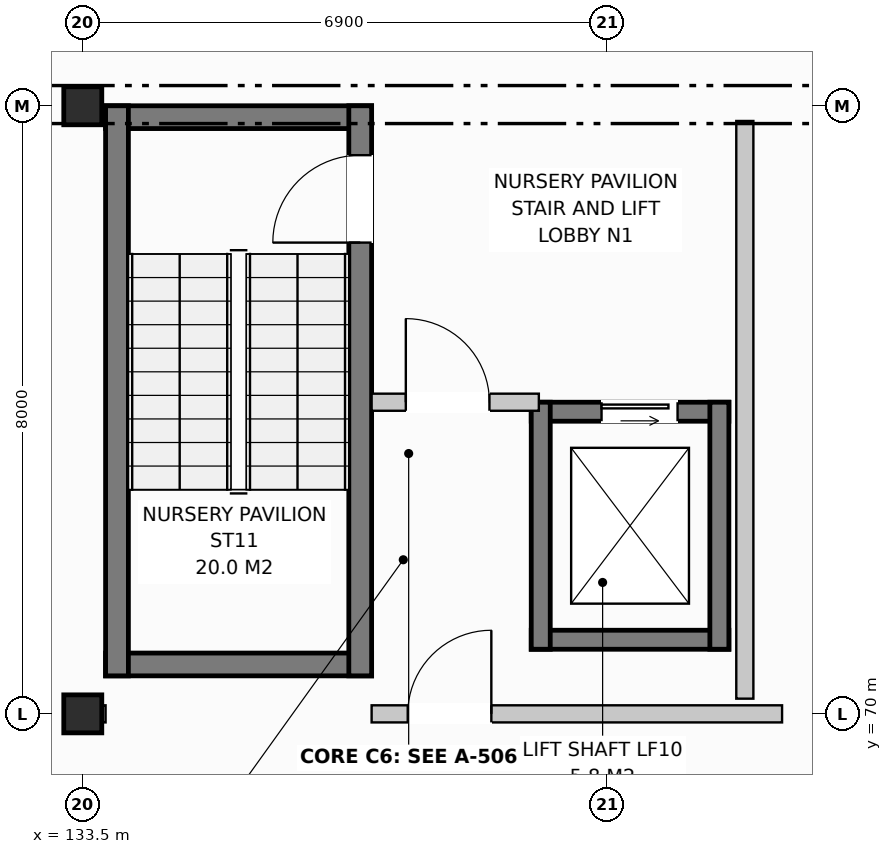
"""IFC4 building model, lengths in metres.
Left out: names, types, materials, properties, quantities, classifications, styles, units other than length and angle.
Written with IfcOpenShell. Run it as: python <this file> out.ifc"""

import sys

from ifc_helpers import new_model, si_unit, direction, frame, frame_2d, origin, origin_with_axes, origin_2d, place, context, subcontext, project, spatial, rectangle, extrude, element, fill, save


model = new_model("IFC4")
c1 = context("Model", 3, precision=1e-05, world=origin(), true_north=direction((0.0, 1.0)))
c2 = subcontext(c1, "Body", "Model", "MODEL_VIEW")
j1 = project(units=[si_unit("LENGTHUNIT", "METRE"), si_unit("PLANEANGLEUNIT", "RADIAN")], contexts=[c1])
p1 = place(None, origin())
s1 = spatial("IfcSite", under=j1, at=p1, CompositionType="ELEMENT")
p2 = place(p1, origin())
s2 = spatial("IfcBuilding", under=s1, at=p2, CompositionType="ELEMENT")
p3 = place(p2, frame((0.0, 0.0, -3.8)))
s3 = spatial("IfcBuildingStorey", under=s2, at=p3, CompositionType="ELEMENT", Elevation=-3.8)
for number, where, z_axis, x_axis in (
    (1, (133.5, 70.0, 0.0), (0.0, 0.0, 1.0), (1.0, 0.0, 0.0)),
    (2, (133.5, 78.0, 0.0), (0.0, 0.0, 1.0), (1.0, 0.0, 0.0)),
):
    element("IfcColumn", number, at=place(p3, frame(where, z_axis=z_axis, x_axis=x_axis)), inside=s3, PredefinedType="COLUMN", context=c2, shape_type="SweptSolid", body=[
        extrude(rectangle(XDim=0.5, YDim=0.5, at=origin_2d()), origin(), (0.0, 0.0, 1.0), 3.8),
    ])
for number, where, z_axis, x_axis in (
    (3, (133.8, 77.85, 0.0), (0.0, 0.0, 1.0), (1.0, 0.0, 0.0)),
    (4, (133.8, 70.65, 0.0), (0.0, 0.0, 1.0), (1.0, 0.0, 0.0)),
):
    element("IfcWall", number, at=place(p3, frame(where, z_axis=z_axis, x_axis=x_axis)), inside=s3, PredefinedType="SHEAR", context=c2, shape_type="SweptSolid", body=[
        extrude(rectangle(XDim=3.5, YDim=0.3, at=frame_2d((1.75, 0.0))), origin(), (0.0, 0.0, 1.0), 3.48),
    ])
p4 = place(p3, frame((133.95, 70.5, 0.0), z_axis=(0.0, 0.0, 1.0), x_axis=(0.0, 1.0, 0.0)))
e5 = element("IfcWall", 5, at=p4, inside=s3, PredefinedType="SHEAR", context=c2, shape_type="SweptSolid", body=[
    extrude(rectangle(XDim=7.5, YDim=0.3, at=frame_2d((3.75, 0.0))), origin(), (0.0, 0.0, 1.0), 3.48),
])
p5 = place(p3, frame((137.15, 70.5, 0.0), z_axis=(0.0, 0.0, 1.0), x_axis=(0.0, 1.0, 0.0)))
e6 = element("IfcWall", 6, at=p5, inside=s3, PredefinedType="SHEAR", context=c2, shape_type="SweptSolid", body=[
    extrude(rectangle(XDim=7.5, YDim=0.3, at=frame_2d((3.75, 0.0))), origin(), (0.0, 0.0, 1.0), 3.48),
])
p6 = place(p5, frame((5.7, 0.0, 0.0)))
e7 = element("IfcOpeningElement", 7, at=p6, cuts=e6, PredefinedType="OPENING", context=c2, shape_type="SweptSolid", body=[
    extrude(rectangle(XDim=1.15, YDim=2.15, at=frame_2d((0.575, 1.075))), frame((0.0, 0.162, 0.0), z_axis=(0.0, -1.0, 0.0), x_axis=(1.0, 0.0, 0.0)), (0.0, 0.0, 1.0), 0.324),
])
p7 = place(p3, frame((139.4, 73.975, 0.0), z_axis=(0.0, 0.0, 1.0), x_axis=(1.0, 0.0, 0.0)))
e8 = element("IfcWall", 8, at=p7, inside=s3, PredefinedType="SHEAR", context=c2, shape_type="SweptSolid", body=[
    extrude(rectangle(XDim=2.6, YDim=0.25, at=frame_2d((1.3, 0.0))), origin(), (0.0, 0.0, 1.0), 3.48),
])
p8 = place(p7, frame((0.925, 0.0, 0.0)))
e9 = element("IfcOpeningElement", 9, at=p8, cuts=e8, PredefinedType="OPENING", context=c2, shape_type="SweptSolid", body=[
    extrude(rectangle(XDim=1.0, YDim=2.1, at=frame_2d((0.5, 1.05))), frame((0.0, 0.137, 0.0), z_axis=(0.0, -1.0, 0.0), x_axis=(1.0, 0.0, 0.0)), (0.0, 0.0, 1.0), 0.274),
])
p9 = place(p3, frame((139.4, 70.975, 0.0), z_axis=(0.0, 0.0, 1.0), x_axis=(1.0, 0.0, 0.0)))
e10 = element("IfcWall", 10, at=p9, inside=s3, PredefinedType="SHEAR", context=c2, shape_type="SweptSolid", body=[
    extrude(rectangle(XDim=2.6, YDim=0.25, at=frame_2d((1.3, 0.0))), origin(), (0.0, 0.0, 1.0), 3.48),
])
for number, where, z_axis, x_axis in (
    (11, (139.525, 70.85, 0.0), (0.0, 0.0, 1.0), (0.0, 1.0, 0.0)),
    (12, (141.875, 70.85, 0.0), (0.0, 0.0, 1.0), (0.0, 1.0, 0.0)),
):
    element("IfcWall", number, at=place(p3, frame(where, z_axis=z_axis, x_axis=x_axis)), inside=s3, PredefinedType="SHEAR", context=c2, shape_type="SweptSolid", body=[
        extrude(rectangle(XDim=3.25, YDim=0.25, at=frame_2d((1.625, 0.0))), origin(), (0.0, 0.0, 1.0), 3.48),
    ])
p10 = place(p3, frame((142.21, 70.2, 0.0), z_axis=(0.0, 0.0, 1.0), x_axis=(0.0, 1.0, 0.0)))
e13 = element("IfcWall", 13, at=p10, inside=s3, PredefinedType="PARTITIONING", context=c2, shape_type="SweptSolid", body=[
    extrude(rectangle(XDim=7.6, YDim=0.225, at=frame_2d((3.8, 0.0))), origin(), (0.0, 0.0, 1.0), 3.48),
])
p11 = place(p3, frame((137.3, 74.1, 0.0), z_axis=(0.0, 0.0, 1.0), x_axis=(1.0, 0.0, 0.0)))
e14 = element("IfcWall", 14, at=p11, inside=s3, PredefinedType="PARTITIONING", context=c2, shape_type="SweptSolid", body=[
    extrude(rectangle(XDim=2.2, YDim=0.225, at=frame_2d((1.1, 0.0))), origin(), (0.0, 0.0, 1.0), 3.48),
])
p12 = place(p11, frame((0.45, 0.0, 0.0)))
e15 = element("IfcOpeningElement", 15, at=p12, cuts=e14, PredefinedType="OPENING", context=c2, shape_type="SweptSolid", body=[
    extrude(rectangle(XDim=1.1, YDim=2.15, at=frame_2d((0.55, 1.075))), frame((0.0, 0.125, 0.0), z_axis=(0.0, -1.0, 0.0), x_axis=(1.0, 0.0, 0.0)), (0.0, 0.0, 1.0), 0.249),
])
p13 = place(p3, frame((133.5, 70.0, 0.0), z_axis=(0.0, 0.0, 1.0), x_axis=(1.0, 0.0, 0.0)))
e16 = element("IfcWall", 16, at=p13, inside=s3, PredefinedType="PARTITIONING", context=c2, shape_type="SweptSolid", body=[
    extrude(rectangle(XDim=0.3, YDim=0.225, at=frame_2d((0.15, 0.0))), origin(), (0.0, 0.0, 1.0), 3.48),
])
p14 = place(p3, frame((137.3, 70.0, 0.0), z_axis=(0.0, 0.0, 1.0), x_axis=(1.0, 0.0, 0.0)))
e17 = element("IfcWall", 17, at=p14, inside=s3, PredefinedType="PARTITIONING", context=c2, shape_type="SweptSolid", body=[
    extrude(rectangle(XDim=5.4, YDim=0.225, at=frame_2d((2.7, 0.0))), origin(), (0.0, 0.0, 1.0), 3.03),
])
p15 = place(p14, frame((0.475, 0.0, 0.0)))
e18 = element("IfcOpeningElement", 18, at=p15, cuts=e17, PredefinedType="OPENING", context=c2, shape_type="SweptSolid", body=[
    extrude(rectangle(XDim=1.1, YDim=2.15, at=frame_2d((0.55, 1.075))), frame((0.0, 0.125, 0.0), z_axis=(0.0, -1.0, 0.0), x_axis=(1.0, 0.0, 0.0)), (0.0, 0.0, 1.0), 0.249),
])
p16 = place(p6, origin_with_axes())
e19 = element("IfcDoor", 19, at=p16, inside=s3, OperationType="SINGLE_SWING_LEFT", PredefinedType="DOOR", context=c2, shape_type="SweptSolid", body=[
    extrude(rectangle(XDim=1.15, YDim=2.15, at=frame_2d((0.575, 1.075))), frame((0.0, 0.025, 0.0), z_axis=(0.0, -1.0, 0.0), x_axis=(1.0, 0.0, 0.0)), (0.0, 0.0, 1.0), 0.05),
])
fill(e7, e19)
p17 = place(p8, origin_with_axes())
e20 = element("IfcDoor", 20, at=p17, inside=s3, OperationType="SLIDING_TO_LEFT", PredefinedType="DOOR", context=c2, shape_type="SweptSolid", body=[
    extrude(rectangle(XDim=1.0, YDim=2.1, at=frame_2d((0.5, 1.05))), frame((0.0, 0.025, 0.0), z_axis=(0.0, -1.0, 0.0), x_axis=(1.0, 0.0, 0.0)), (0.0, 0.0, 1.0), 0.05),
])
fill(e9, e20)
p18 = place(p12, origin_with_axes())
e21 = element("IfcDoor", 21, at=p18, inside=s3, OperationType="SINGLE_SWING_LEFT", PredefinedType="DOOR", context=c2, shape_type="SweptSolid", body=[
    extrude(rectangle(XDim=1.1, YDim=2.15, at=frame_2d((0.55, 1.075))), frame((0.0, 0.025, 0.0), z_axis=(0.0, -1.0, 0.0), x_axis=(1.0, 0.0, 0.0)), (0.0, 0.0, 1.0), 0.05),
])
fill(e15, e21)
p19 = place(p15, origin_with_axes())
e22 = element("IfcDoor", 22, at=p19, inside=s3, OperationType="SINGLE_SWING_RIGHT", PredefinedType="DOOR", context=c2, shape_type="SweptSolid", body=[
    extrude(rectangle(XDim=1.1, YDim=2.15, at=frame_2d((0.55, 1.075))), frame((0.0, 0.025, 0.0), z_axis=(0.0, -1.0, 0.0), x_axis=(1.0, 0.0, 0.0)), (0.0, 0.0, 1.0), 0.05),
])
fill(e18, e22)
save(model, sys.argv[1])
